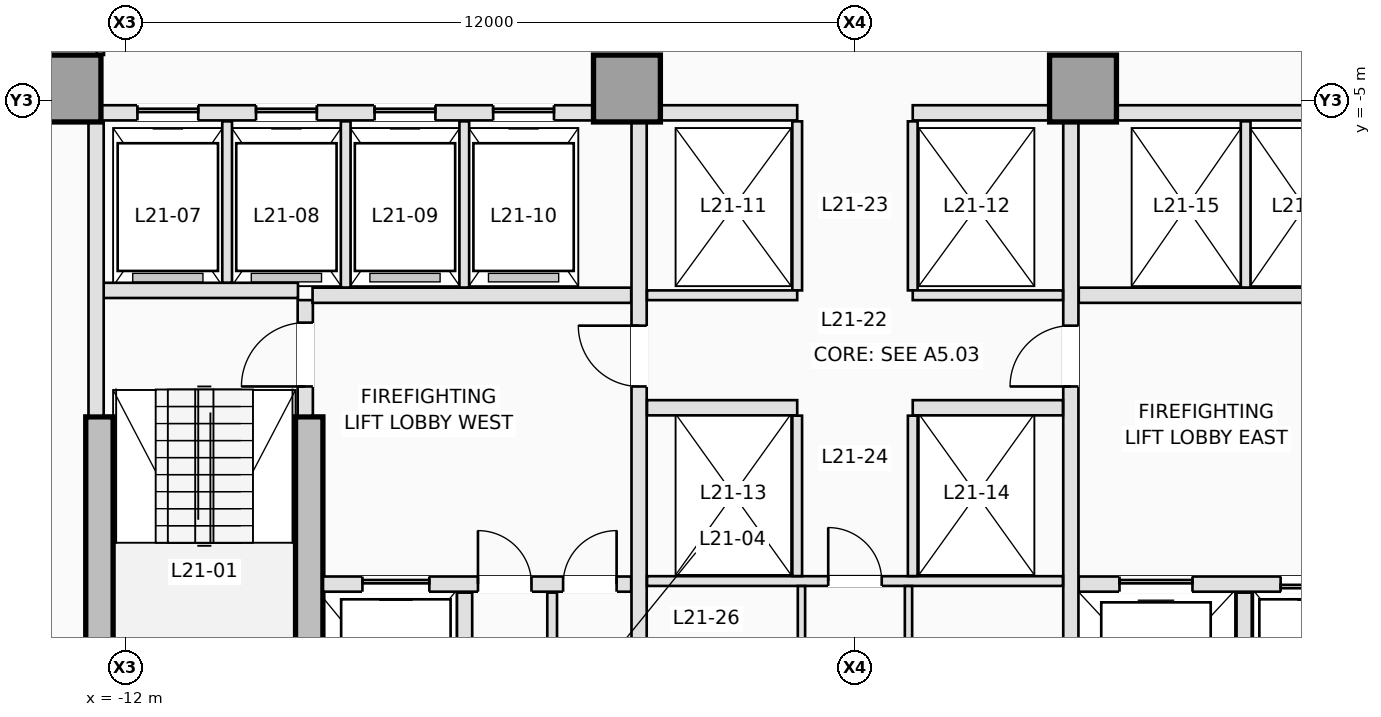
"""IFC4 building model, lengths in metres.
Left out: names, types, materials, properties, quantities, classifications, styles, units other than length and angle.
Written with IfcOpenShell. Run it as: python <this file> out.ifc"""

import sys

from ifc_helpers import new_model, si_unit, direction, frame, frame_2d, origin, origin_2d, place, context, subcontext, project, spatial, rectangle, extrude, element, fill, save


model = new_model("IFC4")
c1 = context("Model", 3, precision=1e-05, world=origin(), true_north=direction((0.0, 1.0)))
c2 = subcontext(c1, "Body", "Model", "MODEL_VIEW")
j1 = project(units=[si_unit("LENGTHUNIT", "METRE"), si_unit("PLANEANGLEUNIT", "RADIAN")], contexts=[c1])
p1 = place(None, origin())
s1 = spatial("IfcSite", under=j1, at=p1, CompositionType="ELEMENT")
p2 = place(p1, origin())
s2 = spatial("IfcBuilding", under=s1, at=p2, CompositionType="ELEMENT")
p3 = place(p2, frame((0.0, 0.0, 80.1)))
s3 = spatial("IfcBuildingStorey", under=s2, at=p3, CompositionType="ELEMENT", Elevation=80.1)
p4 = place(p3, frame((-12.425, -15.725, 0.0), z_axis=(0.0, 0.0, 1.0), x_axis=(0.0, 1.0, 0.0)))
e1 = element("IfcWall", 1, at=p4, inside=s3, PredefinedType="SHEAR", context=c2, shape_type="SweptSolid", body=[
    extrude(rectangle(XDim=5.525, YDim=0.45, at=frame_2d((2.763, 0.0))), origin(), (0.0, 0.0, 1.0), 3.5),
])
p5 = place(p3, frame((-8.975, -16.15, 0.0), z_axis=(0.0, 0.0, 1.0), x_axis=(0.0, 1.0, 0.0)))
e2 = element("IfcWall", 2, at=p5, inside=s3, PredefinedType="SHEAR", context=c2, shape_type="SweptSolid", body=[
    extrude(rectangle(XDim=5.95, YDim=0.45, at=frame_2d((2.975, 0.0))), origin(), (0.0, 0.0, 1.0), 3.5),
])
for number, where, z_axis, x_axis in (
    (3, (-12.95, -4.8, 0.0), (0.0, 0.0, 1.0), (1.0, 0.0, 0.0)),
    (4, (-3.75, -4.8, 0.0), (0.0, 0.0, 1.0), (1.0, 0.0, 0.0)),
    (5, (3.75, -4.8, 0.0), (0.0, 0.0, 1.0), (1.0, 0.0, 0.0)),
):
    element("IfcColumn", number, at=place(p3, frame(where, z_axis=z_axis, x_axis=x_axis)), inside=s3, PredefinedType="COLUMN", context=c2, shape_type="SweptSolid", body=[
        extrude(rectangle(XDim=1.1, YDim=1.1, at=origin_2d()), origin(), (0.0, 0.0, 1.0), 3.5),
    ])
p6 = place(p3, frame((-9.04, -10.18, 0.0), z_axis=(0.0, 0.0, 1.0), x_axis=(0.0, 1.0, 0.0)))
e6 = element("IfcWall", 6, at=p6, inside=s3, PredefinedType="PARTITIONING", context=c2, shape_type="SweptSolid", body=[
    extrude(rectangle(XDim=1.9, YDim=0.25, at=frame_2d((0.95, 0.0))), origin(), (0.0, 0.0, 1.0), 3.25),
])
p7 = place(p6, frame((0.48, 0.0, 0.0)))
e7 = element("IfcOpeningElement", 7, at=p7, cuts=e6, PredefinedType="OPENING", context=c2, shape_type="SweptSolid", body=[
    extrude(rectangle(XDim=1.05, YDim=2.15, at=frame_2d((0.525, 1.075))), frame((0.0, 0.135, 0.0), z_axis=(0.0, -1.0, 0.0), x_axis=(1.0, 0.0, 0.0)), (0.0, 0.0, 1.0), 0.27),
])
p8 = place(p3, frame((-12.38, -8.12, 0.0), z_axis=(0.0, 0.0, 1.0), x_axis=(1.0, 0.0, 0.0)))
e8 = element("IfcWall", 8, at=p8, inside=s3, PredefinedType="PARTITIONING", context=c2, shape_type="SweptSolid", body=[
    extrude(rectangle(XDim=3.22, YDim=0.25, at=frame_2d((1.61, 0.0))), origin(), (0.0, 0.0, 1.0), 3.25),
])
p9 = place(p3, frame((-12.48, -10.18, 0.0), z_axis=(0.0, 0.0, 1.0), x_axis=(0.0, 1.0, 0.0)))
e9 = element("IfcWall", 9, at=p9, inside=s3, PredefinedType="PARTITIONING", context=c2, shape_type="SweptSolid", body=[
    extrude(rectangle(XDim=4.828, YDim=0.25, at=frame_2d((2.414, 0.0))), origin(), (0.0, 0.0, 1.0), 3.25),
])
p10 = place(p3, frame((-8.748, -12.95, 0.0), z_axis=(0.0, 0.0, 1.0), x_axis=(1.0, 0.0, 0.0)))
e10 = element("IfcWall", 10, at=p10, inside=s3, PredefinedType="PARTITIONING", context=c2, shape_type="SweptSolid", body=[
    extrude(rectangle(XDim=5.068, YDim=0.25, at=frame_2d((2.534, 0.0))), origin(), (0.0, 0.0, 1.0), 3.25),
])
p11 = place(p10, frame((0.648, 0.0, 0.0)))
e11 = element("IfcOpeningElement", 11, at=p11, cuts=e10, PredefinedType="OPENING", context=c2, shape_type="SweptSolid", body=[
    extrude(rectangle(XDim=1.1, YDim=2.15, at=frame_2d((0.55, 1.075))), frame((0.0, 0.135, 0.0), z_axis=(0.0, -1.0, 0.0), x_axis=(1.0, 0.0, 0.0)), (0.0, 0.0, 1.0), 0.27),
])
p12 = place(p10, frame((2.548, 0.0, 0.0)))
e12 = element("IfcOpeningElement", 12, at=p12, cuts=e10, PredefinedType="OPENING", context=c2, shape_type="SweptSolid", body=[
    extrude(rectangle(XDim=0.88, YDim=2.1, at=frame_2d((0.44, 1.05))), frame((0.0, 0.135, 0.0), z_axis=(0.0, -1.0, 0.0), x_axis=(1.0, 0.0, 0.0)), (0.0, 0.0, 1.0), 0.27),
])
p13 = place(p10, frame((3.948, 0.0, 0.0)))
e13 = element("IfcOpeningElement", 13, at=p13, cuts=e10, PredefinedType="OPENING", context=c2, shape_type="SweptSolid", body=[
    extrude(rectangle(XDim=0.88, YDim=2.1, at=frame_2d((0.44, 1.05))), frame((0.0, 0.135, 0.0), z_axis=(0.0, -1.0, 0.0), x_axis=(1.0, 0.0, 0.0)), (0.0, 0.0, 1.0), 0.27),
])
p14 = place(p3, frame((3.68, -12.95, 0.0), z_axis=(0.0, 0.0, 1.0), x_axis=(1.0, 0.0, 0.0)))
e14 = element("IfcWall", 14, at=p14, inside=s3, PredefinedType="PARTITIONING", context=c2, shape_type="SweptSolid", body=[
    extrude(rectangle(XDim=5.068, YDim=0.25, at=frame_2d((2.534, 0.0))), origin(), (0.0, 0.0, 1.0), 3.25),
])
p15 = place(p14, frame((3.32, 0.0, 0.0)))
e15 = element("IfcOpeningElement", 15, at=p15, cuts=e14, PredefinedType="OPENING", context=c2, shape_type="SweptSolid", body=[
    extrude(rectangle(XDim=1.1, YDim=2.15, at=frame_2d((0.55, 1.075))), frame((0.0, 0.135, 0.0), z_axis=(0.0, -1.0, 0.0), x_axis=(1.0, 0.0, 0.0)), (0.0, 0.0, 1.0), 0.27),
])
p16 = place(p14, frame((0.67, 0.0, 0.0)))
e16 = element("IfcOpeningElement", 16, at=p16, cuts=e14, PredefinedType="OPENING", context=c2, shape_type="SweptSolid", body=[
    extrude(rectangle(XDim=1.2, YDim=2.15, at=frame_2d((0.6, 1.075))), frame((0.0, 0.135, 0.0), z_axis=(0.0, -1.0, 0.0), x_axis=(1.0, 0.0, 0.0)), (0.0, 0.0, 1.0), 0.27),
])
p17 = place(p3, frame((-6.42, -15.92, 0.0), z_axis=(0.0, 0.0, 1.0), x_axis=(0.0, 1.0, 0.0)))
e17 = element("IfcWall", 17, at=p17, inside=s3, PredefinedType="PARTITIONING", context=c2, shape_type="SweptSolid", body=[
    extrude(rectangle(XDim=2.83, YDim=0.25, at=frame_2d((1.415, 0.0))), origin(), (0.0, 0.0, 1.0), 3.25),
])
p18 = place(p3, frame((-4.98, -15.92, 0.0), z_axis=(0.0, 0.0, 1.0), x_axis=(0.0, 1.0, 0.0)))
e18 = element("IfcWall", 18, at=p18, inside=s3, PredefinedType="PARTITIONING", context=c2, shape_type="SweptSolid", body=[
    extrude(rectangle(XDim=2.83, YDim=0.16, at=frame_2d((1.415, 0.0))), origin(), (0.0, 0.0, 1.0), 3.25),
])
p19 = place(p3, frame((6.4, -15.92, 0.0), z_axis=(0.0, 0.0, 1.0), x_axis=(0.0, 1.0, 0.0)))
e19 = element("IfcWall", 19, at=p19, inside=s3, PredefinedType="PARTITIONING", context=c2, shape_type="SweptSolid", body=[
    extrude(rectangle(XDim=2.83, YDim=0.25, at=frame_2d((1.415, 0.0))), origin(), (0.0, 0.0, 1.0), 3.25),
])
for number, where, z_axis, x_axis in (
    (20, (-8.92, -8.2, 0.0), (0.0, 0.0, 1.0), (1.0, 0.0, 0.0)),
    (21, (3.68, -8.2, 0.0), (0.0, 0.0, 1.0), (1.0, 0.0, 0.0)),
):
    element("IfcWall", number, at=place(p3, frame(where, z_axis=z_axis, x_axis=x_axis)), inside=s3, PredefinedType="PARTITIONING", context=c2, shape_type="SweptSolid", body=[
        extrude(rectangle(XDim=5.24, YDim=0.25, at=frame_2d((2.62, 0.0))), origin(), (0.0, 0.0, 1.0), 3.25),
    ])
p20 = place(p3, frame((-3.55, -15.798, 0.0), z_axis=(0.0, 0.0, 1.0), x_axis=(0.0, 1.0, 0.0)))
e22 = element("IfcWall", 22, at=p20, inside=s3, PredefinedType="PARTITIONING", context=c2, shape_type="SweptSolid", body=[
    extrude(rectangle(XDim=10.446, YDim=0.25, at=frame_2d((5.223, 0.0))), origin(), (0.0, 0.0, 1.0), 3.25),
])
p21 = place(p20, frame((6.098, 0.0, 0.0)))
e23 = element("IfcOpeningElement", 23, at=p21, cuts=e22, PredefinedType="OPENING", context=c2, shape_type="SweptSolid", body=[
    extrude(rectangle(XDim=1.0, YDim=2.15, at=frame_2d((0.5, 1.075))), frame((0.0, 0.135, 0.0), z_axis=(0.0, -1.0, 0.0), x_axis=(1.0, 0.0, 0.0)), (0.0, 0.0, 1.0), 0.27),
])
p22 = place(p3, frame((3.55, -15.798, 0.0), z_axis=(0.0, 0.0, 1.0), x_axis=(0.0, 1.0, 0.0)))
e24 = element("IfcWall", 24, at=p22, inside=s3, PredefinedType="PARTITIONING", context=c2, shape_type="SweptSolid", body=[
    extrude(rectangle(XDim=10.446, YDim=0.25, at=frame_2d((5.223, 0.0))), origin(), (0.0, 0.0, 1.0), 3.25),
])
p23 = place(p22, frame((6.098, 0.0, 0.0)))
e25 = element("IfcOpeningElement", 25, at=p23, cuts=e24, PredefinedType="OPENING", context=c2, shape_type="SweptSolid", body=[
    extrude(rectangle(XDim=1.0, YDim=2.15, at=frame_2d((0.5, 1.075))), frame((0.0, 0.135, 0.0), z_axis=(0.0, -1.0, 0.0), x_axis=(1.0, 0.0, 0.0)), (0.0, 0.0, 1.0), 0.27),
])
p24 = place(p3, frame((-12.398, -5.2, 0.0), z_axis=(0.0, 0.0, 1.0), x_axis=(1.0, 0.0, 0.0)))
e26 = element("IfcWall", 26, at=p24, inside=s3, PredefinedType="PARTITIONING", context=c2, shape_type="SweptSolid", body=[
    extrude(rectangle(XDim=8.096, YDim=0.25, at=frame_2d((4.048, 0.0))), origin(), (0.0, 0.0, 1.0), 3.25),
])
p25 = place(p24, frame((0.598, 0.0, 0.0)))
e27 = element("IfcOpeningElement", 27, at=p25, cuts=e26, PredefinedType="OPENING", context=c2, shape_type="SweptSolid", body=[
    extrude(rectangle(XDim=1.0, YDim=2.15, at=frame_2d((0.5, 1.075))), frame((0.0, 0.135, 0.0), z_axis=(0.0, -1.0, 0.0), x_axis=(1.0, 0.0, 0.0)), (0.0, 0.0, 1.0), 0.27),
])
p26 = place(p24, frame((2.548, 0.0, 0.0)))
e28 = element("IfcOpeningElement", 28, at=p26, cuts=e26, PredefinedType="OPENING", context=c2, shape_type="SweptSolid", body=[
    extrude(rectangle(XDim=1.0, YDim=2.15, at=frame_2d((0.5, 1.075))), frame((0.0, 0.135, 0.0), z_axis=(0.0, -1.0, 0.0), x_axis=(1.0, 0.0, 0.0)), (0.0, 0.0, 1.0), 0.27),
])
p27 = place(p24, frame((4.498, 0.0, 0.0)))
e29 = element("IfcOpeningElement", 29, at=p27, cuts=e26, PredefinedType="OPENING", context=c2, shape_type="SweptSolid", body=[
    extrude(rectangle(XDim=1.0, YDim=2.15, at=frame_2d((0.5, 1.075))), frame((0.0, 0.135, 0.0), z_axis=(0.0, -1.0, 0.0), x_axis=(1.0, 0.0, 0.0)), (0.0, 0.0, 1.0), 0.27),
])
p28 = place(p24, frame((6.448, 0.0, 0.0)))
e30 = element("IfcOpeningElement", 30, at=p28, cuts=e26, PredefinedType="OPENING", context=c2, shape_type="SweptSolid", body=[
    extrude(rectangle(XDim=1.0, YDim=2.15, at=frame_2d((0.5, 1.075))), frame((0.0, 0.135, 0.0), z_axis=(0.0, -1.0, 0.0), x_axis=(1.0, 0.0, 0.0)), (0.0, 0.0, 1.0), 0.27),
])
p29 = place(p3, frame((4.302, -5.2, 0.0), z_axis=(0.0, 0.0, 1.0), x_axis=(1.0, 0.0, 0.0)))
e31 = element("IfcWall", 31, at=p29, inside=s3, PredefinedType="PARTITIONING", context=c2, shape_type="SweptSolid", body=[
    extrude(rectangle(XDim=8.096, YDim=0.25, at=frame_2d((4.048, 0.0))), origin(), (0.0, 0.0, 1.0), 3.25),
])
for number, where, z_axis, x_axis in (
    (32, (-3.198, -5.2, 0.0), (0.0, 0.0, 1.0), (1.0, 0.0, 0.0)),
    (33, (0.95, -5.2, 0.0), (0.0, 0.0, 1.0), (1.0, 0.0, 0.0)),
):
    element("IfcWall", number, at=place(p3, frame(where, z_axis=z_axis, x_axis=x_axis)), inside=s3, PredefinedType="PARTITIONING", context=c2, shape_type="SweptSolid", body=[
        extrude(rectangle(XDim=2.248, YDim=0.25, at=frame_2d((1.124, 0.0))), origin(), (0.0, 0.0, 1.0), 3.25),
    ])
p30 = place(p3, frame((-10.325, -7.993, 0.0), z_axis=(0.0, 0.0, 1.0), x_axis=(0.0, 1.0, 0.0)))
e34 = element("IfcWall", 34, at=p30, inside=s3, PredefinedType="PARTITIONING", context=c2, shape_type="SweptSolid", body=[
    extrude(rectangle(XDim=2.653, YDim=0.16, at=frame_2d((1.326, 0.0))), origin(), (0.0, 0.0, 1.0), 3.25),
])
for number, where, z_axis, x_axis in (
    (35, (-8.375, -8.073, 0.0), (0.0, 0.0, 1.0), (0.0, 1.0, 0.0)),
    (36, (-6.425, -8.073, 0.0), (0.0, 0.0, 1.0), (0.0, 1.0, 0.0)),
    (37, (6.425, -8.073, 0.0), (0.0, 0.0, 1.0), (0.0, 1.0, 0.0)),
):
    element("IfcWall", number, at=place(p3, frame(where, z_axis=z_axis, x_axis=x_axis)), inside=s3, PredefinedType="PARTITIONING", context=c2, shape_type="SweptSolid", body=[
        extrude(rectangle(XDim=2.733, YDim=0.16, at=frame_2d((1.366, 0.0))), origin(), (0.0, 0.0, 1.0), 3.25),
    ])
for number, where, z_axis, x_axis in (
    (38, (-0.95, -8.12, 0.0), (0.0, 0.0, 1.0), (0.0, 1.0, 0.0)),
    (39, (0.95, -8.12, 0.0), (0.0, 0.0, 1.0), (0.0, 1.0, 0.0)),
):
    element("IfcWall", number, at=place(p3, frame(where, z_axis=z_axis, x_axis=x_axis)), inside=s3, PredefinedType="PARTITIONING", context=c2, shape_type="SweptSolid", body=[
        extrude(rectangle(XDim=2.78, YDim=0.16, at=frame_2d((1.39, 0.0))), origin(), (0.0, 0.0, 1.0), 3.25),
    ])
for number, where, z_axis, x_axis in (
    (40, (-3.42, -8.2, 0.0), (0.0, 0.0, 1.0), (1.0, 0.0, 0.0)),
    (41, (0.95, -8.2, 0.0), (0.0, 0.0, 1.0), (1.0, 0.0, 0.0)),
):
    element("IfcWall", number, at=place(p3, frame(where, z_axis=z_axis, x_axis=x_axis)), inside=s3, PredefinedType="PARTITIONING", context=c2, shape_type="SweptSolid", body=[
        extrude(rectangle(XDim=2.47, YDim=0.16, at=frame_2d((1.235, 0.0))), origin(), (0.0, 0.0, 1.0), 3.25),
    ])
for number, where, z_axis, x_axis in (
    (42, (-3.42, -10.05, 0.0), (0.0, 0.0, 1.0), (1.0, 0.0, 0.0)),
    (43, (0.95, -10.05, 0.0), (0.0, 0.0, 1.0), (1.0, 0.0, 0.0)),
):
    element("IfcWall", number, at=place(p3, frame(where, z_axis=z_axis, x_axis=x_axis)), inside=s3, PredefinedType="PARTITIONING", context=c2, shape_type="SweptSolid", body=[
        extrude(rectangle(XDim=2.47, YDim=0.25, at=frame_2d((1.235, 0.0))), origin(), (0.0, 0.0, 1.0), 3.25),
    ])
p31 = place(p3, frame((-3.42, -12.9, 0.0), z_axis=(0.0, 0.0, 1.0), x_axis=(1.0, 0.0, 0.0)))
e44 = element("IfcWall", 44, at=p31, inside=s3, PredefinedType="PARTITIONING", context=c2, shape_type="SweptSolid", body=[
    extrude(rectangle(XDim=6.84, YDim=0.16, at=frame_2d((3.42, 0.0))), origin(), (0.0, 0.0, 1.0), 3.25),
])
p32 = place(p31, frame((2.98, 0.0, 0.0)))
e45 = element("IfcOpeningElement", 45, at=p32, cuts=e44, PredefinedType="OPENING", context=c2, shape_type="SweptSolid", body=[
    extrude(rectangle(XDim=0.88, YDim=2.12, at=frame_2d((0.44, 1.06))), frame((0.0, 0.09, 0.0), z_axis=(0.0, -1.0, 0.0), x_axis=(1.0, 0.0, 0.0)), (0.0, 0.0, 1.0), 0.18),
])
for number, where, z_axis, x_axis in (
    (46, (-0.95, -12.818, 0.0), (0.0, 0.0, 1.0), (0.0, 1.0, 0.0)),
    (47, (0.95, -12.818, 0.0), (0.0, 0.0, 1.0), (0.0, 1.0, 0.0)),
):
    element("IfcWall", number, at=place(p3, frame(where, z_axis=z_axis, x_axis=x_axis)), inside=s3, PredefinedType="PARTITIONING", context=c2, shape_type="SweptSolid", body=[
        extrude(rectangle(XDim=2.638, YDim=0.16, at=frame_2d((1.319, 0.0))), origin(), (0.0, 0.0, 1.0), 3.25),
    ])
p33 = place(p3, frame((-0.88, -16.02, 0.0), z_axis=(0.0, 0.0, 1.0), x_axis=(0.0, 1.0, 0.0)))
e48 = element("IfcWall", 48, at=p33, inside=s3, PredefinedType="PARTITIONING", context=c2, shape_type="SweptSolid", body=[
    extrude(rectangle(XDim=3.038, YDim=0.12, at=frame_2d((1.519, 0.0))), origin(), (0.0, 0.0, 1.0), 3.25),
])
p34 = place(p33, frame((1.05, 0.0, 0.0)))
e49 = element("IfcOpeningElement", 49, at=p34, cuts=e48, PredefinedType="OPENING", context=c2, shape_type="SweptSolid", body=[
    extrude(rectangle(XDim=0.88, YDim=2.12, at=frame_2d((0.44, 1.06))), frame((0.0, 0.07, 0.0), z_axis=(0.0, -1.0, 0.0), x_axis=(1.0, 0.0, 0.0)), (0.0, 0.0, 1.0), 0.14),
])
p35 = place(p3, frame((0.88, -16.02, 0.0), z_axis=(0.0, 0.0, 1.0), x_axis=(0.0, 1.0, 0.0)))
e50 = element("IfcWall", 50, at=p35, inside=s3, PredefinedType="PARTITIONING", context=c2, shape_type="SweptSolid", body=[
    extrude(rectangle(XDim=3.038, YDim=0.12, at=frame_2d((1.519, 0.0))), origin(), (0.0, 0.0, 1.0), 3.25),
])
p36 = place(p35, frame((1.05, 0.0, 0.0)))
e51 = element("IfcOpeningElement", 51, at=p36, cuts=e50, PredefinedType="OPENING", context=c2, shape_type="SweptSolid", body=[
    extrude(rectangle(XDim=0.88, YDim=2.12, at=frame_2d((0.44, 1.06))), frame((0.0, 0.07, 0.0), z_axis=(0.0, -1.0, 0.0), x_axis=(1.0, 0.0, 0.0)), (0.0, 0.0, 1.0), 0.14),
])
p37 = place(p3, frame((-12.41, -4.248, 0.0), z_axis=(0.0, 0.0, 1.0), x_axis=(0.0, 1.0, 0.0)))
e52 = element("IfcWall", 52, at=p37, inside=s3, PredefinedType="PARTITIONING", context=c2, shape_type="SweptSolid", body=[
    extrude(rectangle(XDim=1.786, YDim=0.12, at=frame_2d((0.893, 0.0))), origin(), (0.0, 0.0, 1.0), 3.25),
])
p38 = place(p25, origin())
e53 = element("IfcDoor", 53, at=p38, inside=s3, OperationType="SLIDING_TO_LEFT", PredefinedType="DOOR", context=c2, shape_type="SweptSolid", body=[
    extrude(rectangle(XDim=1.0, YDim=2.15, at=frame_2d((0.5, 1.075))), frame((0.0, 0.025, 0.0), z_axis=(0.0, -1.0, 0.0), x_axis=(1.0, 0.0, 0.0)), (0.0, 0.0, 1.0), 0.05),
])
fill(e27, e53)
p39 = place(p26, origin())
e54 = element("IfcDoor", 54, at=p39, inside=s3, OperationType="SLIDING_TO_LEFT", PredefinedType="DOOR", context=c2, shape_type="SweptSolid", body=[
    extrude(rectangle(XDim=1.0, YDim=2.15, at=frame_2d((0.5, 1.075))), frame((0.0, 0.025, 0.0), z_axis=(0.0, -1.0, 0.0), x_axis=(1.0, 0.0, 0.0)), (0.0, 0.0, 1.0), 0.05),
])
fill(e28, e54)
p40 = place(p27, origin())
e55 = element("IfcDoor", 55, at=p40, inside=s3, OperationType="SLIDING_TO_LEFT", PredefinedType="DOOR", context=c2, shape_type="SweptSolid", body=[
    extrude(rectangle(XDim=1.0, YDim=2.15, at=frame_2d((0.5, 1.075))), frame((0.0, 0.025, 0.0), z_axis=(0.0, -1.0, 0.0), x_axis=(1.0, 0.0, 0.0)), (0.0, 0.0, 1.0), 0.05),
])
fill(e29, e55)
p41 = place(p28, origin())
e56 = element("IfcDoor", 56, at=p41, inside=s3, OperationType="SLIDING_TO_LEFT", PredefinedType="DOOR", context=c2, shape_type="SweptSolid", body=[
    extrude(rectangle(XDim=1.0, YDim=2.15, at=frame_2d((0.5, 1.075))), frame((0.0, 0.025, 0.0), z_axis=(0.0, -1.0, 0.0), x_axis=(1.0, 0.0, 0.0)), (0.0, 0.0, 1.0), 0.05),
])
fill(e30, e56)
p42 = place(p11, origin())
e57 = element("IfcDoor", 57, at=p42, inside=s3, OperationType="SLIDING_TO_LEFT", PredefinedType="DOOR", context=c2, shape_type="SweptSolid", body=[
    extrude(rectangle(XDim=1.1, YDim=2.15, at=frame_2d((0.55, 1.075))), frame((0.0, 0.025, 0.0), z_axis=(0.0, -1.0, 0.0), x_axis=(1.0, 0.0, 0.0)), (0.0, 0.0, 1.0), 0.05),
])
fill(e11, e57)
p43 = place(p15, origin())
e58 = element("IfcDoor", 58, at=p43, inside=s3, OperationType="SLIDING_TO_RIGHT", PredefinedType="DOOR", context=c2, shape_type="SweptSolid", body=[
    extrude(rectangle(XDim=1.1, YDim=2.15, at=frame_2d((0.55, 1.075))), frame((0.0, 0.025, 0.0), z_axis=(0.0, -1.0, 0.0), x_axis=(1.0, 0.0, 0.0)), (0.0, 0.0, 1.0), 0.05),
])
fill(e15, e58)
p44 = place(p16, origin())
e59 = element("IfcDoor", 59, at=p44, inside=s3, OperationType="SLIDING_TO_LEFT", PredefinedType="DOOR", context=c2, shape_type="SweptSolid", body=[
    extrude(rectangle(XDim=1.2, YDim=2.15, at=frame_2d((0.6, 1.075))), frame((0.0, 0.025, 0.0), z_axis=(0.0, -1.0, 0.0), x_axis=(1.0, 0.0, 0.0)), (0.0, 0.0, 1.0), 0.05),
])
fill(e16, e59)
p45 = place(p7, origin())
e60 = element("IfcDoor", 60, at=p45, inside=s3, OperationType="SINGLE_SWING_LEFT", PredefinedType="DOOR", context=c2, shape_type="SweptSolid", body=[
    extrude(rectangle(XDim=1.05, YDim=2.15, at=frame_2d((0.525, 1.075))), frame((0.0, 0.025, 0.0), z_axis=(0.0, -1.0, 0.0), x_axis=(1.0, 0.0, 0.0)), (0.0, 0.0, 1.0), 0.05),
])
fill(e7, e60)
p46 = place(p12, origin())
e61 = element("IfcDoor", 61, at=p46, inside=s3, OperationType="SINGLE_SWING_LEFT", PredefinedType="TRAPDOOR", context=c2, shape_type="SweptSolid", body=[
    extrude(rectangle(XDim=0.88, YDim=2.1, at=frame_2d((0.44, 1.05))), frame((0.0, 0.025, 0.0), z_axis=(0.0, -1.0, 0.0), x_axis=(1.0, 0.0, 0.0)), (0.0, 0.0, 1.0), 0.05),
])
fill(e12, e61)
p47 = place(p13, origin())
e62 = element("IfcDoor", 62, at=p47, inside=s3, OperationType="SINGLE_SWING_RIGHT", PredefinedType="TRAPDOOR", context=c2, shape_type="SweptSolid", body=[
    extrude(rectangle(XDim=0.88, YDim=2.1, at=frame_2d((0.44, 1.05))), frame((0.0, 0.025, 0.0), z_axis=(0.0, -1.0, 0.0), x_axis=(1.0, 0.0, 0.0)), (0.0, 0.0, 1.0), 0.05),
])
fill(e13, e62)
p48 = place(p21, origin())
e63 = element("IfcDoor", 63, at=p48, inside=s3, OperationType="SINGLE_SWING_RIGHT", PredefinedType="DOOR", context=c2, shape_type="SweptSolid", body=[
    extrude(rectangle(XDim=1.0, YDim=2.15, at=frame_2d((0.5, 1.075))), frame((0.0, 0.025, 0.0), z_axis=(0.0, -1.0, 0.0), x_axis=(1.0, 0.0, 0.0)), (0.0, 0.0, 1.0), 0.05),
])
fill(e23, e63)
p49 = place(p23, origin())
e64 = element("IfcDoor", 64, at=p49, inside=s3, OperationType="SINGLE_SWING_LEFT", PredefinedType="DOOR", context=c2, shape_type="SweptSolid", body=[
    extrude(rectangle(XDim=1.0, YDim=2.15, at=frame_2d((0.5, 1.075))), frame((0.0, 0.025, 0.0), z_axis=(0.0, -1.0, 0.0), x_axis=(1.0, 0.0, 0.0)), (0.0, 0.0, 1.0), 0.05),
])
fill(e25, e64)
p50 = place(p32, origin())
e65 = element("IfcDoor", 65, at=p50, inside=s3, OperationType="SINGLE_SWING_LEFT", PredefinedType="DOOR", context=c2, shape_type="SweptSolid", body=[
    extrude(rectangle(XDim=0.88, YDim=2.12, at=frame_2d((0.44, 1.06))), frame((0.0, 0.025, 0.0), z_axis=(0.0, -1.0, 0.0), x_axis=(1.0, 0.0, 0.0)), (0.0, 0.0, 1.0), 0.05),
])
fill(e45, e65)
save(model, sys.argv[1])
